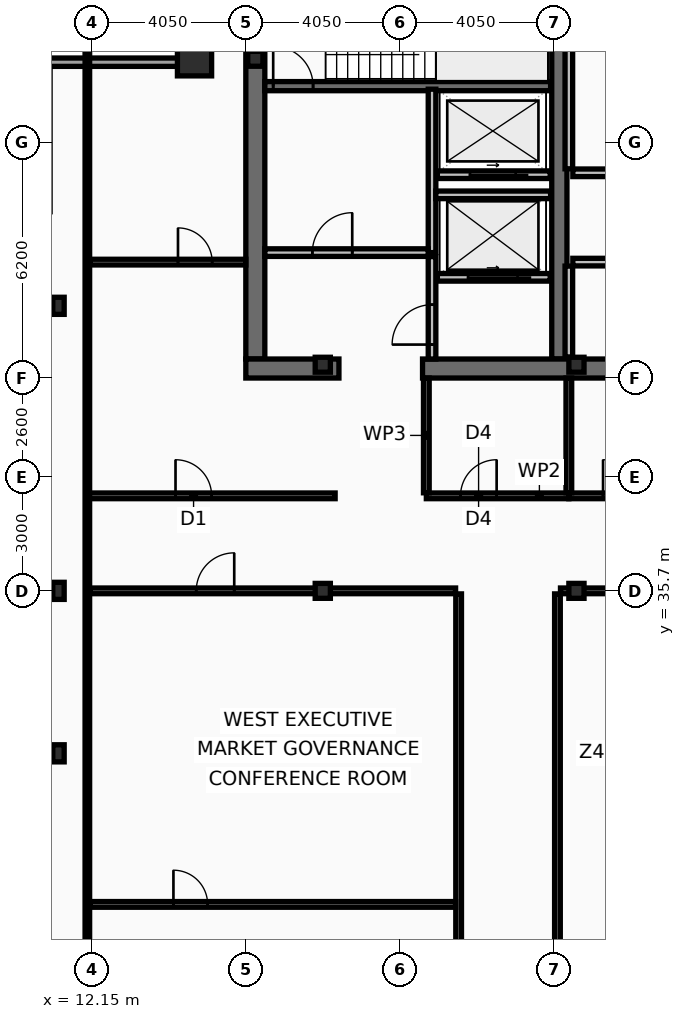
"""IFC4 building model, lengths in metres.
Left out: names, types, materials, properties, quantities, classifications, styles, units other than length and angle.
Written with IfcOpenShell. Run it as: python <this file> out.ifc"""

import sys

from ifc_helpers import new_model, si_unit, direction, frame, frame_2d, origin, origin_2d, place, context, subcontext, project, spatial, rectangle, hollow_rectangle, i_section, extrude, element, fill, save


model = new_model("IFC4")
c1 = context("Model", 3, precision=1e-05, world=origin(), true_north=direction((0.0, 1.0)))
c2 = subcontext(c1, "Body", "Model", "MODEL_VIEW")
j1 = project(units=[si_unit("LENGTHUNIT", "METRE"), si_unit("PLANEANGLEUNIT", "RADIAN")], contexts=[c1])
p1 = place(None, origin())
s1 = spatial("IfcSite", under=j1, at=p1, CompositionType="ELEMENT")
p2 = place(p1, origin())
s2 = spatial("IfcBuilding", under=s1, at=p2, CompositionType="ELEMENT")
p3 = place(p2, frame((0.0, 0.0, 295.0)))
s3 = spatial("IfcBuildingStorey", under=s2, at=p3, CompositionType="ELEMENT", Elevation=295.0)
p4 = place(p3, frame((16.45, 41.8, 0.0), z_axis=(0.0, 0.0, 1.0), x_axis=(0.0, 1.0, 0.0)))
e1 = element("IfcWall", 1, at=p4, inside=s3, PredefinedType="SHEAR", context=c2, shape_type="SweptSolid", body=[
    extrude(rectangle(XDim=11.4, YDim=0.5, at=frame_2d((5.7, 0.0))), origin(), (0.0, 0.0, 1.0), 3.44),
])
p5 = place(p3, frame((24.45, 41.8, 0.0), z_axis=(0.0, 0.0, 1.0), x_axis=(0.0, 1.0, 0.0)))
e2 = element("IfcWall", 2, at=p5, inside=s3, PredefinedType="SHEAR", context=c2, shape_type="SweptSolid", body=[
    extrude(rectangle(XDim=11.4, YDim=0.4, at=frame_2d((5.7, 0.0))), origin(), (0.0, 0.0, 1.0), 3.44),
])
p6 = place(p3, frame((18.65, 41.55, 0.0), z_axis=(0.0, 0.0, 1.0), x_axis=(-1.0, 0.0, 0.0)))
e3 = element("IfcWall", 3, at=p6, inside=s3, PredefinedType="SHEAR", context=c2, shape_type="SweptSolid", body=[
    extrude(rectangle(XDim=2.45, YDim=0.5, at=frame_2d((1.225, 0.0))), origin(), (0.0, 0.0, 1.0), 3.44),
])
p7 = place(p3, frame((32.3, 41.55, 0.0), z_axis=(0.0, 0.0, 1.0), x_axis=(-1.0, 0.0, 0.0)))
e4 = element("IfcWall", 4, at=p7, inside=s3, PredefinedType="SHEAR", context=c2, shape_type="SweptSolid", body=[
    extrude(rectangle(XDim=11.45, YDim=0.5, at=frame_2d((5.725, 0.0))), origin(), (0.0, 0.0, 1.0), 3.44),
])
p8 = place(p3, frame((16.7, 48.98, 0.0), z_axis=(0.0, 0.0, 1.0), x_axis=(1.0, 0.0, 0.0)))
e5 = element("IfcWall", 5, at=p8, inside=s3, PredefinedType="SHEAR", context=c2, shape_type="SweptSolid", body=[
    extrude(rectangle(XDim=7.52, YDim=0.24, at=frame_2d((3.76, 0.0))), origin(), (0.0, 0.0, 1.0), 3.44),
])
p9 = place(p8, frame((0.22, 0.0, 0.0)))
e6 = element("IfcOpeningElement", 6, at=p9, cuts=e5, PredefinedType="OPENING", context=c2, shape_type="SweptSolid", body=[
    extrude(rectangle(XDim=1.05, YDim=2.15, at=frame_2d((0.525, 1.075))), frame((0.0, 0.13, 0.0), z_axis=(0.0, -1.0, 0.0), x_axis=(1.0, 0.0, 0.0)), (0.0, 0.0, 1.0), 0.26),
])
p10 = place(p3, frame((14.85, 49.7, 0.0), z_axis=(0.0, 0.0, 1.0), x_axis=(1.0, 0.0, 0.0)))
e7 = element("IfcColumn", 7, at=p10, inside=s3, PredefinedType="COLUMN", context=c2, shape_type="SweptSolid", body=[
    extrude(hollow_rectangle(XDim=0.9, YDim=0.9, WallThickness=0.05, at=origin_2d()), origin(), (0.0, 0.0, 1.0), 3.6),
])
for number, where, z_axis, x_axis in (
    (8, (11.27, 31.425, 0.0), (0.0, 0.0, 1.0), (1.0, 0.0, 0.0)),
    (9, (11.27, 35.7, 0.0), (0.0, 0.0, 1.0), (1.0, 0.0, 0.0)),
    (10, (11.27, 43.2, 0.0), (0.0, 0.0, 1.0), (1.0, 0.0, 0.0)),
):
    element("IfcColumn", number, at=place(p3, frame(where, z_axis=z_axis, x_axis=x_axis)), inside=s3, PredefinedType="COLUMN", context=c2, shape_type="SweptSolid", body=[
        extrude(i_section(OverallWidth=0.3, OverallDepth=0.45, WebThickness=0.014, FlangeThickness=0.026, at=origin_2d()), origin(), (0.0, 0.0, 1.0), 3.6),
    ])
for number, where, z_axis, x_axis in (
    (11, (16.45, 49.7, 0.0), (0.0, 0.0, 1.0), (1.0, 0.0, 0.0)),
    (12, (18.225, 35.7, 0.0), (0.0, 0.0, 1.0), (1.0, 0.0, 0.0)),
    (13, (18.225, 41.65, 0.0), (0.0, 0.0, 1.0), (1.0, 0.0, 0.0)),
    (14, (24.9, 35.7, 0.0), (0.0, 0.0, 1.0), (1.0, 0.0, 0.0)),
    (15, (24.9, 41.65, 0.0), (0.0, 0.0, 1.0), (1.0, 0.0, 0.0)),
):
    element("IfcColumn", number, at=place(p3, frame(where, z_axis=z_axis, x_axis=x_axis)), inside=s3, PredefinedType="COLUMN", context=c2, shape_type="SweptSolid", body=[
        extrude(i_section(OverallWidth=0.399, OverallDepth=0.393, WebThickness=0.023, FlangeThickness=0.037, at=origin_2d()), origin(), (0.0, 0.0, 1.0), 3.6),
    ])
p11 = place(p3, frame((10.83, 49.61, 0.0), z_axis=(0.0, 0.0, 1.0), x_axis=(1.0, 0.0, 0.0)))
e16 = element("IfcWall", 16, at=p11, inside=s3, PredefinedType="SOLIDWALL", context=c2, shape_type="SweptSolid", body=[
    extrude(rectangle(XDim=4.22, YDim=0.22, at=frame_2d((2.11, 0.0))), origin(), (0.0, 0.0, 1.0), 2.88),
])
p12 = place(p3, frame((14.94, 49.72, 0.0), z_axis=(0.0, 0.0, 1.0), x_axis=(0.0, 1.0, 0.0)))
e17 = element("IfcWall", 17, at=p12, inside=s3, PredefinedType="SOLIDWALL", context=c2, shape_type="SweptSolid", body=[
    extrude(rectangle(XDim=3.91, YDim=0.22, at=frame_2d((1.955, 0.0))), origin(), (0.0, 0.0, 1.0), 2.88),
])
p13 = place(p3, frame((24.21, 43.95, 0.0), z_axis=(0.0, 0.0, 1.0), x_axis=(-1.0, 0.0, 0.0)))
e18 = element("IfcWall", 18, at=p13, inside=s3, PredefinedType="PARTITIONING", context=c2, shape_type="SweptSolid", body=[
    extrude(rectangle(XDim=2.97, YDim=0.2, at=frame_2d((1.485, 0.0))), origin(), (0.0, 0.0, 1.0), 3.44),
])
p14 = place(p13, frame((0.86, 0.0, 0.0)))
e19 = element("IfcOpeningElement", 19, at=p14, cuts=e18, PredefinedType="OPENING", context=c2, shape_type="SweptSolid", body=[
    extrude(rectangle(XDim=1.3, YDim=2.18, at=frame_2d((0.65, 1.09))), frame((0.0, 0.11, 0.0), z_axis=(0.0, -1.0, 0.0), x_axis=(1.0, 0.0, 0.0)), (0.0, 0.0, 1.0), 0.22),
])
p15 = place(p3, frame((24.21, 46.65, 0.0), z_axis=(0.0, 0.0, 1.0), x_axis=(-1.0, 0.0, 0.0)))
e20 = element("IfcWall", 20, at=p15, inside=s3, PredefinedType="PARTITIONING", context=c2, shape_type="SweptSolid", body=[
    extrude(rectangle(XDim=2.97, YDim=0.2, at=frame_2d((1.485, 0.0))), origin(), (0.0, 0.0, 1.0), 3.44),
])
p16 = place(p15, frame((0.91, 0.0, 0.0)))
e21 = element("IfcOpeningElement", 21, at=p16, cuts=e20, PredefinedType="OPENING", context=c2, shape_type="SweptSolid", body=[
    extrude(rectangle(XDim=1.2, YDim=2.18, at=frame_2d((0.6, 1.09))), frame((0.0, 0.11, 0.0), z_axis=(0.0, -1.0, 0.0), x_axis=(1.0, 0.0, 0.0)), (0.0, 0.0, 1.0), 0.22),
])
p17 = place(p3, frame((21.1, 44.6, 0.0), z_axis=(0.0, 0.0, 1.0), x_axis=(0.0, 1.0, 0.0)))
e22 = element("IfcWall", 22, at=p17, inside=s3, PredefinedType="PARTITIONING", context=c2, shape_type="SweptSolid", body=[
    extrude(rectangle(XDim=4.3, YDim=0.2, at=frame_2d((2.15, 0.0))), origin(), (0.0, 0.0, 1.0), 3.44),
])
p18 = place(p3, frame((16.7, 44.6, 0.0), z_axis=(0.0, 0.0, 1.0), x_axis=(1.0, 0.0, 0.0)))
e23 = element("IfcWall", 23, at=p18, inside=s3, PredefinedType="PARTITIONING", context=c2, shape_type="SweptSolid", body=[
    extrude(rectangle(XDim=4.3, YDim=0.2, at=frame_2d((2.15, 0.0))), origin(), (0.0, 0.0, 1.0), 3.44),
])
p19 = place(p18, frame((1.25, 0.0, 0.0)))
e24 = element("IfcOpeningElement", 24, at=p19, cuts=e23, PredefinedType="OPENING", context=c2, shape_type="SweptSolid", body=[
    extrude(rectangle(XDim=1.05, YDim=2.15, at=frame_2d((0.525, 1.075))), frame((0.0, 0.11, 0.0), z_axis=(0.0, -1.0, 0.0), x_axis=(1.0, 0.0, 0.0)), (0.0, 0.0, 1.0), 0.22),
])
p20 = place(p3, frame((21.2, 46.12, 0.0), z_axis=(0.0, 0.0, 1.0), x_axis=(1.0, 0.0, 0.0)))
e25 = element("IfcWall", 25, at=p20, inside=s3, PredefinedType="PARTITIONING", context=c2, shape_type="SweptSolid", body=[
    extrude(rectangle(XDim=3.02, YDim=0.2, at=frame_2d((1.51, 0.0))), origin(), (0.0, 0.0, 1.0), 3.44),
])
p21 = place(p3, frame((21.1, 41.8, 0.0), z_axis=(0.0, 0.0, 1.0), x_axis=(0.0, 1.0, 0.0)))
e26 = element("IfcWall", 26, at=p21, inside=s3, PredefinedType="PARTITIONING", context=c2, shape_type="SweptSolid", body=[
    extrude(rectangle(XDim=2.695, YDim=0.2, at=frame_2d((1.348, 0.0))), origin(), (0.0, 0.0, 1.0), 3.44),
])
p22 = place(p21, frame((0.38, 0.0, 0.0)))
e27 = element("IfcOpeningElement", 27, at=p22, cuts=e26, PredefinedType="OPENING", context=c2, shape_type="SweptSolid", body=[
    extrude(rectangle(XDim=1.05, YDim=2.15, at=frame_2d((0.525, 1.075))), frame((0.0, 0.11, 0.0), z_axis=(0.0, -1.0, 0.0), x_axis=(1.0, 0.0, 0.0)), (0.0, 0.0, 1.0), 0.22),
])
p23 = place(p3, frame((24.7, 46.805, 0.0), z_axis=(0.0, 0.0, 1.0), x_axis=(0.0, 1.0, 0.0)))
e28 = element("IfcWall", 28, at=p23, inside=s3, PredefinedType="PARTITIONING", context=c2, shape_type="SweptSolid", body=[
    extrude(rectangle(XDim=5.99, YDim=0.2, at=frame_2d((2.995, 0.0))), origin(), (0.0, 0.0, 1.0), 3.44),
])
p24 = place(p3, frame((24.805, 46.7, 0.0), z_axis=(0.0, 0.0, 1.0), x_axis=(1.0, 0.0, 0.0)))
e29 = element("IfcWall", 29, at=p24, inside=s3, PredefinedType="PARTITIONING", context=c2, shape_type="SweptSolid", body=[
    extrude(rectangle(XDim=7.51, YDim=0.2, at=frame_2d((3.755, 0.0))), origin(), (0.0, 0.0, 1.0), 3.44),
])
p25 = place(p24, frame((1.15, 0.0, 0.0)))
e30 = element("IfcOpeningElement", 30, at=p25, cuts=e29, PredefinedType="OPENING", context=c2, shape_type="SweptSolid", body=[
    extrude(rectangle(XDim=0.95, YDim=2.1, at=frame_2d((0.475, 1.05))), frame((0.0, 0.11, 0.0), z_axis=(0.0, -1.0, 0.0), x_axis=(1.0, 0.0, 0.0)), (0.0, 0.0, 1.0), 0.22),
])
p26 = place(p24, frame((5.336, 0.0, 0.0)))
e31 = element("IfcOpeningElement", 31, at=p26, cuts=e29, PredefinedType="OPENING", context=c2, shape_type="SweptSolid", body=[
    extrude(rectangle(XDim=0.95, YDim=2.1, at=frame_2d((0.475, 1.05))), frame((0.0, 0.11, 0.0), z_axis=(0.0, -1.0, 0.0), x_axis=(1.0, 0.0, 0.0)), (0.0, 0.0, 1.0), 0.22),
])
p27 = place(p3, frame((24.7, 41.85, 0.0), z_axis=(0.0, 0.0, 1.0), x_axis=(0.0, 1.0, 0.0)))
e32 = element("IfcWall", 32, at=p27, inside=s3, PredefinedType="PARTITIONING", context=c2, shape_type="SweptSolid", body=[
    extrude(rectangle(XDim=2.395, YDim=0.2, at=frame_2d((1.198, 0.0))), origin(), (0.0, 0.0, 1.0), 3.44),
])
p28 = place(p3, frame((24.805, 44.35, 0.0), z_axis=(0.0, 0.0, 1.0), x_axis=(1.0, 0.0, 0.0)))
e33 = element("IfcWall", 33, at=p28, inside=s3, PredefinedType="PARTITIONING", context=c2, shape_type="SweptSolid", body=[
    extrude(rectangle(XDim=7.34, YDim=0.2, at=frame_2d((3.67, 0.0))), origin(), (0.0, 0.0, 1.0), 3.44),
])
p29 = place(p28, frame((1.15, 0.0, 0.0)))
e34 = element("IfcOpeningElement", 34, at=p29, cuts=e33, PredefinedType="OPENING", context=c2, shape_type="SweptSolid", body=[
    extrude(rectangle(XDim=0.95, YDim=2.1, at=frame_2d((0.475, 1.05))), frame((0.0, 0.11, 0.0), z_axis=(0.0, -1.0, 0.0), x_axis=(1.0, 0.0, 0.0)), (0.0, 0.0, 1.0), 0.22),
])
p30 = place(p28, frame((5.231, 0.0, 0.0)))
e35 = element("IfcOpeningElement", 35, at=p30, cuts=e33, PredefinedType="OPENING", context=c2, shape_type="SweptSolid", body=[
    extrude(rectangle(XDim=0.95, YDim=2.1, at=frame_2d((0.475, 1.05))), frame((0.0, 0.11, 0.0), z_axis=(0.0, -1.0, 0.0), x_axis=(1.0, 0.0, 0.0)), (0.0, 0.0, 1.0), 0.22),
])
p31 = place(p3, frame((20.95, 38.2, 0.0), z_axis=(0.0, 0.0, 1.0), x_axis=(1.0, 0.0, 0.0)))
e36 = element("IfcWall", 36, at=p31, inside=s3, PredefinedType="PARTITIONING", context=c2, shape_type="SweptSolid", body=[
    extrude(rectangle(XDim=3.75, YDim=0.15, at=frame_2d((1.875, 0.0))), origin(), (0.0, 0.0, 1.0), 2.78),
])
p32 = place(p31, frame((0.9, 0.0, 0.0)))
e37 = element("IfcOpeningElement", 37, at=p32, cuts=e36, PredefinedType="OPENING", context=c2, shape_type="SweptSolid", body=[
    extrude(rectangle(XDim=0.95, YDim=2.05, at=frame_2d((0.475, 1.025))), frame((0.0, 0.085, 0.0), z_axis=(0.0, -1.0, 0.0), x_axis=(1.0, 0.0, 0.0)), (0.0, 0.0, 1.0), 0.17),
])
p33 = place(p3, frame((24.7, 38.2, 0.0), z_axis=(0.0, 0.0, 1.0), x_axis=(1.0, 0.0, 0.0)))
e38 = element("IfcWall", 38, at=p33, inside=s3, PredefinedType="PARTITIONING", context=c2, shape_type="SweptSolid", body=[
    extrude(rectangle(XDim=4.1, YDim=0.15, at=frame_2d((2.05, 0.0))), origin(), (0.0, 0.0, 1.0), 2.78),
])
p34 = place(p33, frame((0.9, 0.0, 0.0)))
e39 = element("IfcOpeningElement", 39, at=p34, cuts=e38, PredefinedType="OPENING", context=c2, shape_type="SweptSolid", body=[
    extrude(rectangle(XDim=0.95, YDim=2.05, at=frame_2d((0.475, 1.025))), frame((0.0, 0.085, 0.0), z_axis=(0.0, -1.0, 0.0), x_axis=(1.0, 0.0, 0.0)), (0.0, 0.0, 1.0), 0.17),
])
p35 = place(p3, frame((20.95, 38.28, 0.0), z_axis=(0.0, 0.0, 1.0), x_axis=(0.0, 1.0, 0.0)))
e40 = element("IfcWall", 40, at=p35, inside=s3, PredefinedType="PARTITIONING", context=c2, shape_type="SweptSolid", body=[
    extrude(rectangle(XDim=3.02, YDim=0.15, at=frame_2d((1.51, 0.0))), origin(), (0.0, 0.0, 1.0), 3.44),
])
p36 = place(p3, frame((24.7, 38.28, 0.0), z_axis=(0.0, 0.0, 1.0), x_axis=(0.0, 1.0, 0.0)))
e41 = element("IfcWall", 41, at=p36, inside=s3, PredefinedType="PARTITIONING", context=c2, shape_type="SweptSolid", body=[
    extrude(rectangle(XDim=3.02, YDim=0.15, at=frame_2d((1.51, 0.0))), origin(), (0.0, 0.0, 1.0), 2.78),
])
p37 = place(p3, frame((12.03, 38.2, 0.0), z_axis=(0.0, 0.0, 1.0), x_axis=(1.0, 0.0, 0.0)))
e42 = element("IfcWall", 42, at=p37, inside=s3, PredefinedType="PARTITIONING", context=c2, shape_type="SweptSolid", body=[
    extrude(rectangle(XDim=6.52, YDim=0.15, at=frame_2d((3.26, 0.0))), origin(), (0.0, 0.0, 1.0), 2.78),
])
p38 = place(p37, frame((2.32, 0.0, 0.0)))
e43 = element("IfcOpeningElement", 43, at=p38, cuts=e42, PredefinedType="OPENING", context=c2, shape_type="SweptSolid", body=[
    extrude(rectangle(XDim=0.95, YDim=2.05, at=frame_2d((0.475, 1.025))), frame((0.0, 0.085, 0.0), z_axis=(0.0, -1.0, 0.0), x_axis=(1.0, 0.0, 0.0)), (0.0, 0.0, 1.0), 0.17),
])
p39 = place(p3, frame((12.095, 44.35, 0.0), z_axis=(0.0, 0.0, 1.0), x_axis=(1.0, 0.0, 0.0)))
e44 = element("IfcWall", 44, at=p39, inside=s3, PredefinedType="PARTITIONING", context=c2, shape_type="SweptSolid", body=[
    extrude(rectangle(XDim=4.105, YDim=0.15, at=frame_2d((2.052, 0.0))), origin(), (0.0, 0.0, 1.0), 2.88),
])
p40 = place(p39, frame((2.32, 0.0, 0.0)))
e45 = element("IfcOpeningElement", 45, at=p40, cuts=e44, PredefinedType="OPENING", context=c2, shape_type="SweptSolid", body=[
    extrude(rectangle(XDim=0.9, YDim=2.05, at=frame_2d((0.45, 1.025))), frame((0.0, 0.085, 0.0), z_axis=(0.0, -1.0, 0.0), x_axis=(1.0, 0.0, 0.0)), (0.0, 0.0, 1.0), 0.17),
])
p41 = place(p3, frame((21.8, 10.665, 0.0), z_axis=(0.0, 0.0, 1.0), x_axis=(0.0, 1.0, 0.0)))
e46 = element("IfcWall", 46, at=p41, inside=s3, PredefinedType="PARTITIONING", context=c2, shape_type="SweptSolid", body=[
    extrude(rectangle(XDim=24.955, YDim=0.15, at=frame_2d((12.478, 0.0))), origin(), (0.0, 0.0, 1.0), 3.03),
])
p42 = place(p41, frame((4.2, 0.0, 0.0)))
e47 = element("IfcOpeningElement", 47, at=p42, cuts=e46, PredefinedType="OPENING", context=c2, shape_type="SweptSolid", body=[
    extrude(rectangle(XDim=1.1, YDim=2.1, at=frame_2d((0.55, 1.05))), frame((0.0, 0.085, 0.0), z_axis=(0.0, -1.0, 0.0), x_axis=(1.0, 0.0, 0.0)), (0.0, 0.0, 1.0), 0.17),
])
p43 = place(p3, frame((12.095, 35.7, 0.0), z_axis=(0.0, 0.0, 1.0), x_axis=(1.0, 0.0, 0.0)))
e48 = element("IfcWall", 48, at=p43, inside=s3, PredefinedType="PARTITIONING", context=c2, shape_type="SweptSolid", body=[
    extrude(rectangle(XDim=9.625, YDim=0.15, at=frame_2d((4.812, 0.0))), origin(), (0.0, 0.0, 1.0), 2.78),
])
p44 = place(p43, frame((2.8, 0.0, 0.0)))
e49 = element("IfcOpeningElement", 49, at=p44, cuts=e48, PredefinedType="OPENING", context=c2, shape_type="SweptSolid", body=[
    extrude(rectangle(XDim=1.0, YDim=2.05, at=frame_2d((0.5, 1.025))), frame((0.0, 0.085, 0.0), z_axis=(0.0, -1.0, 0.0), x_axis=(1.0, 0.0, 0.0)), (0.0, 0.0, 1.0), 0.17),
])
p45 = place(p3, frame((12.095, 27.45, 0.0), z_axis=(0.0, 0.0, 1.0), x_axis=(1.0, 0.0, 0.0)))
e50 = element("IfcWall", 50, at=p45, inside=s3, PredefinedType="PARTITIONING", context=c2, shape_type="SweptSolid", body=[
    extrude(rectangle(XDim=9.625, YDim=0.15, at=frame_2d((4.812, 0.0))), origin(), (0.0, 0.0, 1.0), 2.78),
])
p46 = place(p45, frame((2.2, 0.0, 0.0)))
e51 = element("IfcOpeningElement", 51, at=p46, cuts=e50, PredefinedType="OPENING", context=c2, shape_type="SweptSolid", body=[
    extrude(rectangle(XDim=0.9, YDim=2.05, at=frame_2d((0.45, 1.025))), frame((0.0, 0.085, 0.0), z_axis=(0.0, -1.0, 0.0), x_axis=(1.0, 0.0, 0.0)), (0.0, 0.0, 1.0), 0.17),
])
p47 = place(p3, frame((24.4, 21.235, 0.0), z_axis=(0.0, 0.0, 1.0), x_axis=(0.0, 1.0, 0.0)))
e52 = element("IfcWall", 52, at=p47, inside=s3, PredefinedType="PARTITIONING", context=c2, shape_type="SweptSolid", body=[
    extrude(rectangle(XDim=14.385, YDim=0.15, at=frame_2d((7.192, 0.0))), origin(), (0.0, 0.0, 1.0), 2.78),
])
p48 = place(p3, frame((24.48, 35.7, 0.0), z_axis=(0.0, 0.0, 1.0), x_axis=(1.0, 0.0, 0.0)))
e53 = element("IfcWall", 53, at=p48, inside=s3, PredefinedType="PARTITIONING", context=c2, shape_type="SweptSolid", body=[
    extrude(rectangle(XDim=25.02, YDim=0.15, at=frame_2d((12.51, 0.0))), origin(), (0.0, 0.0, 1.0), 2.78),
])
p49 = place(p3, frame((12.03, 10.665, 0.0), z_axis=(0.0, 0.0, 1.0), x_axis=(0.0, 1.0, 0.0)))
e54 = element("IfcWall", 54, at=p49, inside=s3, PredefinedType="PARTITIONING", context=c2, shape_type="SweptSolid", body=[
    extrude(rectangle(XDim=42.11, YDim=0.12, at=frame_2d((21.055, 0.0))), origin(), (0.0, 0.0, 1.0), 2.78),
])
p50 = place(p9, origin())
e55 = element("IfcDoor", 55, at=p50, inside=s3, OperationType="SINGLE_SWING_LEFT", PredefinedType="DOOR", context=c2, shape_type="SweptSolid", body=[
    extrude(rectangle(XDim=1.05, YDim=2.15, at=frame_2d((0.525, 1.075))), frame((0.0, 0.025, 0.0), z_axis=(0.0, -1.0, 0.0), x_axis=(1.0, 0.0, 0.0)), (0.0, 0.0, 1.0), 0.05),
])
fill(e6, e55)
p51 = place(p14, origin())
e56 = element("IfcDoor", 56, at=p51, inside=s3, OperationType="SLIDING_TO_LEFT", PredefinedType="DOOR", context=c2, shape_type="SweptSolid", body=[
    extrude(rectangle(XDim=1.3, YDim=2.18, at=frame_2d((0.65, 1.09))), frame((0.0, 0.025, 0.0), z_axis=(0.0, -1.0, 0.0), x_axis=(1.0, 0.0, 0.0)), (0.0, 0.0, 1.0), 0.05),
])
fill(e19, e56)
p52 = place(p16, origin())
e57 = element("IfcDoor", 57, at=p52, inside=s3, OperationType="SLIDING_TO_LEFT", PredefinedType="DOOR", context=c2, shape_type="SweptSolid", body=[
    extrude(rectangle(XDim=1.2, YDim=2.18, at=frame_2d((0.6, 1.09))), frame((0.0, 0.025, 0.0), z_axis=(0.0, -1.0, 0.0), x_axis=(1.0, 0.0, 0.0)), (0.0, 0.0, 1.0), 0.05),
])
fill(e21, e57)
p53 = place(p19, origin())
e58 = element("IfcDoor", 58, at=p53, inside=s3, OperationType="SINGLE_SWING_RIGHT", PredefinedType="DOOR", context=c2, shape_type="SweptSolid", body=[
    extrude(rectangle(XDim=1.05, YDim=2.15, at=frame_2d((0.525, 1.075))), frame((0.0, 0.025, 0.0), z_axis=(0.0, -1.0, 0.0), x_axis=(1.0, 0.0, 0.0)), (0.0, 0.0, 1.0), 0.05),
])
fill(e24, e58)
p54 = place(p22, origin())
e59 = element("IfcDoor", 59, at=p54, inside=s3, OperationType="SINGLE_SWING_LEFT", PredefinedType="DOOR", context=c2, shape_type="SweptSolid", body=[
    extrude(rectangle(XDim=1.05, YDim=2.15, at=frame_2d((0.525, 1.075))), frame((0.0, 0.025, 0.0), z_axis=(0.0, -1.0, 0.0), x_axis=(1.0, 0.0, 0.0)), (0.0, 0.0, 1.0), 0.05),
])
fill(e27, e59)
p55 = place(p32, origin())
e60 = element("IfcDoor", 60, at=p55, inside=s3, OperationType="SINGLE_SWING_RIGHT", PredefinedType="DOOR", context=c2, shape_type="SweptSolid", body=[
    extrude(rectangle(XDim=0.95, YDim=2.05, at=frame_2d((0.475, 1.025))), frame((0.0, 0.025, 0.0), z_axis=(0.0, -1.0, 0.0), x_axis=(1.0, 0.0, 0.0)), (0.0, 0.0, 1.0), 0.05),
])
fill(e37, e60)
p56 = place(p34, origin())
e61 = element("IfcDoor", 61, at=p56, inside=s3, OperationType="SINGLE_SWING_LEFT", PredefinedType="DOOR", context=c2, shape_type="SweptSolid", body=[
    extrude(rectangle(XDim=0.95, YDim=2.05, at=frame_2d((0.475, 1.025))), frame((0.0, 0.025, 0.0), z_axis=(0.0, -1.0, 0.0), x_axis=(1.0, 0.0, 0.0)), (0.0, 0.0, 1.0), 0.05),
])
fill(e39, e61)
p57 = place(p38, origin())
e62 = element("IfcDoor", 62, at=p57, inside=s3, OperationType="SINGLE_SWING_LEFT", PredefinedType="DOOR", context=c2, shape_type="SweptSolid", body=[
    extrude(rectangle(XDim=0.95, YDim=2.05, at=frame_2d((0.475, 1.025))), frame((0.0, 0.025, 0.0), z_axis=(0.0, -1.0, 0.0), x_axis=(1.0, 0.0, 0.0)), (0.0, 0.0, 1.0), 0.05),
])
fill(e43, e62)
p58 = place(p40, origin())
e63 = element("IfcDoor", 63, at=p58, inside=s3, OperationType="SINGLE_SWING_LEFT", PredefinedType="DOOR", context=c2, shape_type="SweptSolid", body=[
    extrude(rectangle(XDim=0.9, YDim=2.05, at=frame_2d((0.45, 1.025))), frame((0.0, 0.025, 0.0), z_axis=(0.0, -1.0, 0.0), x_axis=(1.0, 0.0, 0.0)), (0.0, 0.0, 1.0), 0.05),
])
fill(e45, e63)
p59 = place(p44, origin())
e64 = element("IfcDoor", 64, at=p59, inside=s3, OperationType="SINGLE_SWING_RIGHT", PredefinedType="DOOR", context=c2, shape_type="SweptSolid", body=[
    extrude(rectangle(XDim=1.0, YDim=2.05, at=frame_2d((0.5, 1.025))), frame((0.0, 0.025, 0.0), z_axis=(0.0, -1.0, 0.0), x_axis=(1.0, 0.0, 0.0)), (0.0, 0.0, 1.0), 0.05),
])
fill(e49, e64)
p60 = place(p46, origin())
e65 = element("IfcDoor", 65, at=p60, inside=s3, OperationType="SINGLE_SWING_LEFT", PredefinedType="DOOR", context=c2, shape_type="SweptSolid", body=[
    extrude(rectangle(XDim=0.9, YDim=2.05, at=frame_2d((0.45, 1.025))), frame((0.0, 0.025, 0.0), z_axis=(0.0, -1.0, 0.0), x_axis=(1.0, 0.0, 0.0)), (0.0, 0.0, 1.0), 0.05),
])
fill(e51, e65)
save(model, sys.argv[1])
